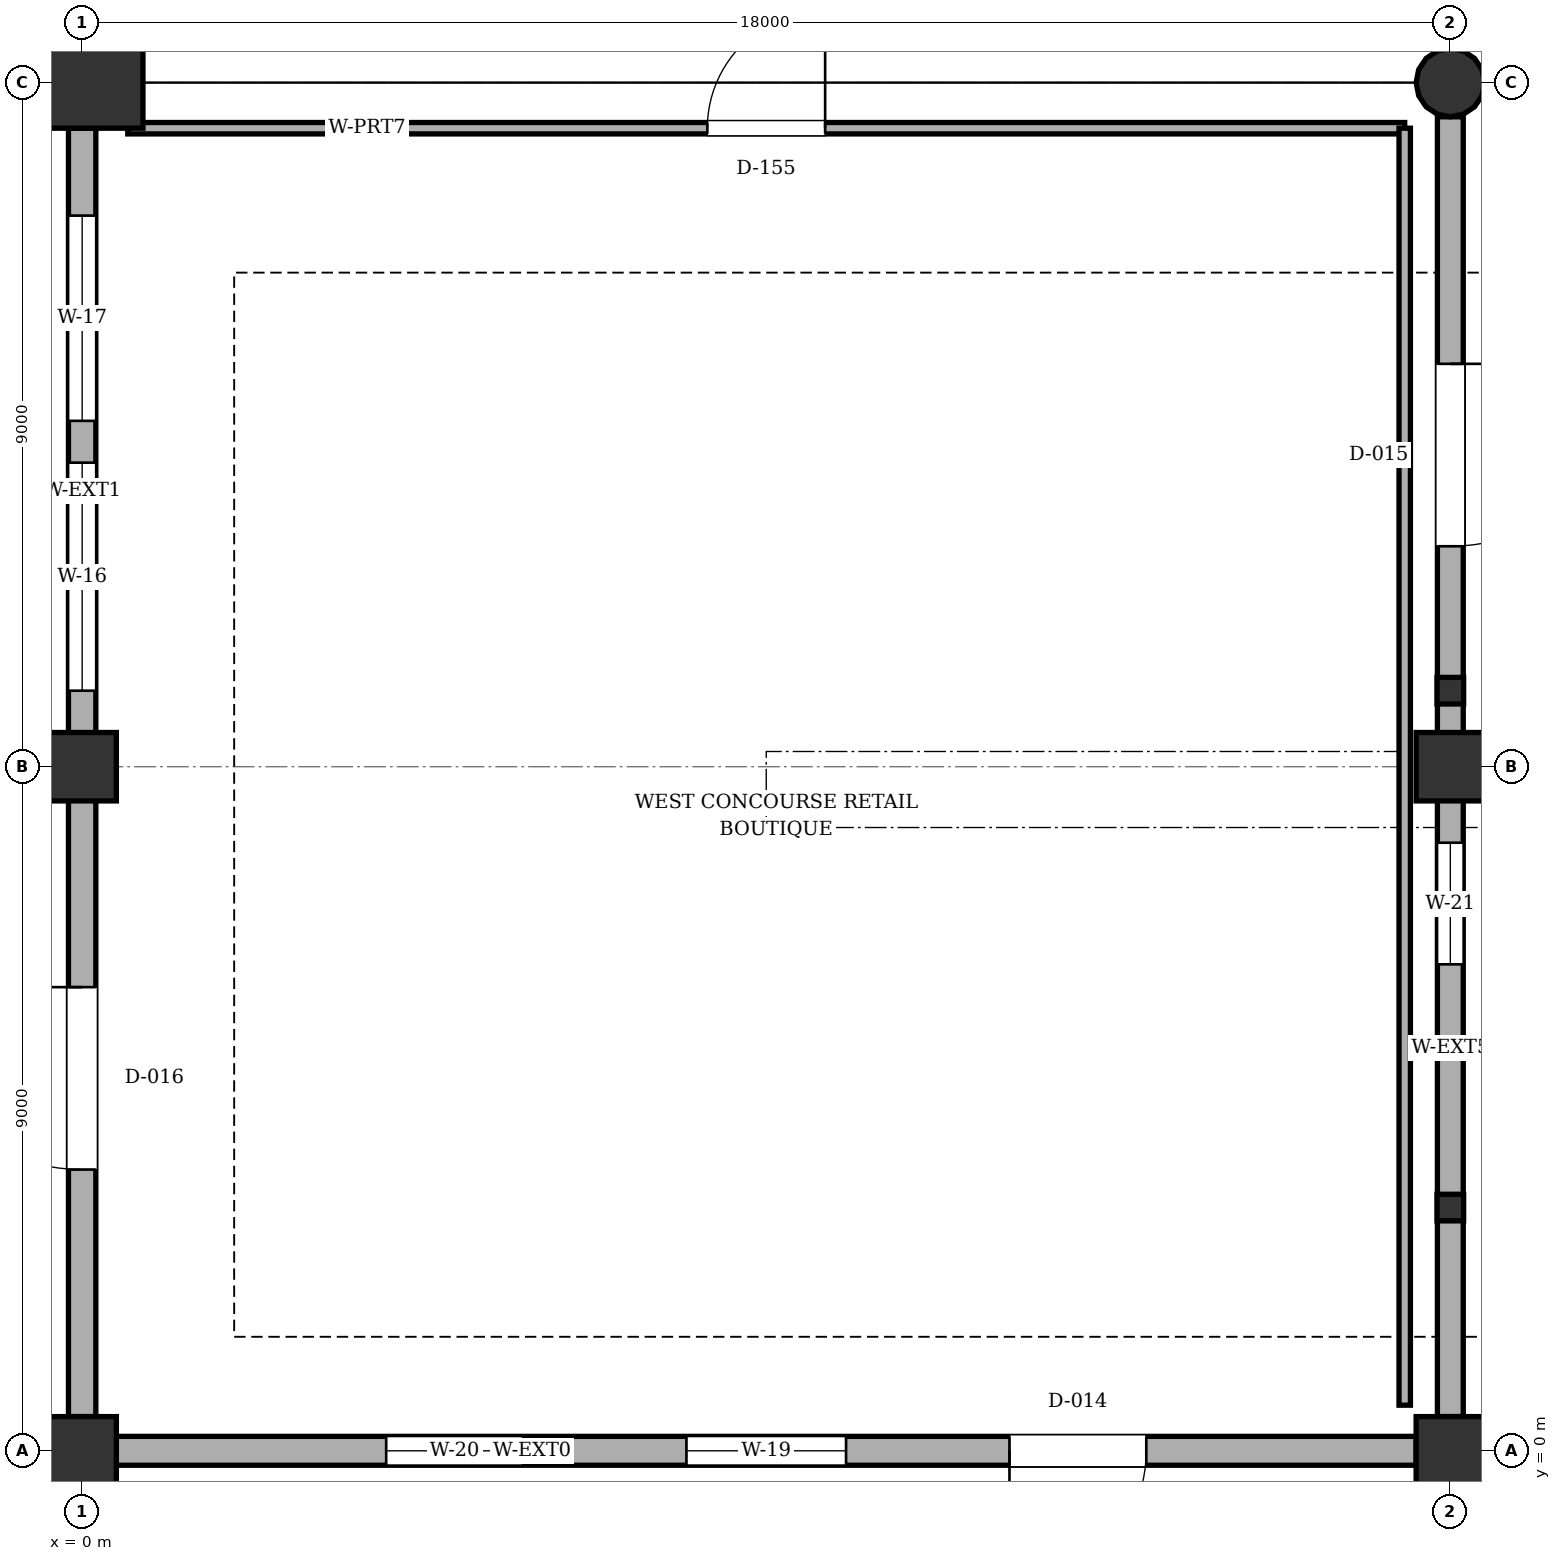
"""IFC4 building model, lengths in metres.
Left out: names, types, materials, properties, quantities, classifications, styles, units other than length and angle.
Written with IfcOpenShell. Run it as: python <this file> out.ifc"""

import sys

from ifc_helpers import new_model, si_unit, direction, frame, frame_2d, origin, origin_2d, place, context, subcontext, project, spatial, rectangle, circle, i_section, extrude, element, fill, save


model = new_model("IFC4")
c1 = context("Model", 3, precision=1e-05, world=origin(), true_north=direction((0.0, 1.0)))
c2 = subcontext(c1, "Body", "Model", "MODEL_VIEW")
j1 = project(units=[si_unit("LENGTHUNIT", "METRE"), si_unit("PLANEANGLEUNIT", "RADIAN")], contexts=[c1])
p1 = place(None, origin())
s1 = spatial("IfcSite", under=j1, at=p1, CompositionType="ELEMENT")
p2 = place(p1, origin())
s2 = spatial("IfcBuilding", under=s1, at=p2, CompositionType="ELEMENT")
p3 = place(p2, origin())
s3 = spatial("IfcBuildingStorey", under=s2, at=p3, CompositionType="ELEMENT", Elevation=0.0)
for number, where, z_axis, x_axis in (
    (1, (0.0, 0.0, 0.0), (0.0, 0.0, 1.0), (1.0, 0.0, 0.0)),
    (2, (0.0, 9.0, 0.0), (0.0, 0.0, 1.0), (1.0, 0.0, 0.0)),
):
    element("IfcColumn", number, at=place(p3, frame(where, z_axis=z_axis, x_axis=x_axis)), inside=s3, PredefinedType="COLUMN", context=c2, shape_type="SweptSolid", body=[
        extrude(rectangle(XDim=0.9, YDim=0.9, at=origin_2d()), origin(), (0.0, 0.0, 1.0), 6.6),
    ])
p4 = place(p3, frame((0.0, 18.0, 0.0), z_axis=(0.0, 0.0, 1.0), x_axis=(1.0, 0.0, 0.0)))
e3 = element("IfcColumn", 3, at=p4, inside=s3, PredefinedType="COLUMN", context=c2, shape_type="SweptSolid", body=[
    extrude(rectangle(XDim=1.6, YDim=1.2, at=origin_2d()), origin(), (0.0, 0.0, 1.0), 6.6),
])
for number, where, z_axis, x_axis in (
    (4, (18.0, 0.0, 0.0), (0.0, 0.0, 1.0), (1.0, 0.0, 0.0)),
    (5, (18.0, 9.0, 0.0), (0.0, 0.0, 1.0), (1.0, 0.0, 0.0)),
):
    element("IfcColumn", number, at=place(p3, frame(where, z_axis=z_axis, x_axis=x_axis)), inside=s3, PredefinedType="COLUMN", context=c2, shape_type="SweptSolid", body=[
        extrude(rectangle(XDim=0.9, YDim=0.9, at=origin_2d()), origin(), (0.0, 0.0, 1.0), 6.6),
    ])
p5 = place(p3, frame((18.0, 18.0, 0.0), z_axis=(0.0, 0.0, 1.0), x_axis=(1.0, 0.0, 0.0)))
e6 = element("IfcColumn", 6, at=p5, inside=s3, PredefinedType="COLUMN", context=c2, shape_type="SweptSolid", body=[
    extrude(circle(Radius=0.45, at=origin_2d()), origin(), (0.0, 0.0, 1.0), 6.6),
])
for number, where, z_axis, x_axis in (
    (7, (18.0, 3.2, 0.0), (0.0, 0.0, 1.0), (1.0, 0.0, 0.0)),
    (8, (18.0, 10.0, 0.0), (0.0, 0.0, 1.0), (1.0, 0.0, 0.0)),
):
    element("IfcColumn", number, at=place(p3, frame(where, z_axis=z_axis, x_axis=x_axis)), inside=s3, PredefinedType="COLUMN", context=c2, shape_type="SweptSolid", body=[
        extrude(i_section(OverallWidth=0.35, OverallDepth=0.35, WebThickness=0.012, FlangeThickness=0.019, FilletRadius=0.02, at=origin_2d()), origin(), (0.0, 0.0, 1.0), 7.62),
    ])
p6 = place(p3, frame((17.55, 0.0, 0.0), z_axis=(0.0, 0.0, 1.0), x_axis=(-1.0, 0.0, 0.0)))
e9 = element("IfcWall", 9, at=p6, inside=s3, PredefinedType="SOLIDWALL", context=c2, shape_type="SweptSolid", body=[
    extrude(rectangle(XDim=17.1, YDim=0.38, at=frame_2d((8.55, 0.0))), origin(), (0.0, 0.0, 1.0), 5.79),
])
p7 = place(p6, frame((3.55, 0.0, 0.0)))
e10 = element("IfcOpeningElement", 10, at=p7, cuts=e9, PredefinedType="OPENING", context=c2, shape_type="SweptSolid", body=[
    extrude(rectangle(XDim=1.8, YDim=2.35, at=frame_2d((0.9, 1.175))), frame((0.0, 0.2, 0.0), z_axis=(0.0, -1.0, 0.0), x_axis=(1.0, 0.0, 0.0)), (0.0, 0.0, 1.0), 0.4),
])
p8 = place(p6, frame((7.5, 0.0, 0.95)))
e11 = element("IfcOpeningElement", 11, at=p8, cuts=e9, PredefinedType="OPENING", context=c2, shape_type="SweptSolid", body=[
    extrude(rectangle(XDim=2.1, YDim=2.0, at=frame_2d((1.05, 1.0))), frame((0.0, 0.2, 0.0), z_axis=(0.0, -1.0, 0.0), x_axis=(1.0, 0.0, 0.0)), (0.0, 0.0, 1.0), 0.4),
])
p9 = place(p6, frame((11.75, 0.0, 0.95)))
e12 = element("IfcOpeningElement", 12, at=p9, cuts=e9, PredefinedType="OPENING", context=c2, shape_type="SweptSolid", body=[
    extrude(rectangle(XDim=1.8, YDim=2.0, at=frame_2d((0.9, 1.0))), frame((0.0, 0.2, 0.0), z_axis=(0.0, -1.0, 0.0), x_axis=(1.0, 0.0, 0.0)), (0.0, 0.0, 1.0), 0.4),
])
p10 = place(p3, frame((18.0, 17.55, 0.0), z_axis=(0.0, 0.0, 1.0), x_axis=(0.0, -1.0, 0.0)))
e13 = element("IfcWall", 13, at=p10, inside=s3, PredefinedType="SOLIDWALL", context=c2, shape_type="SweptSolid", body=[
    extrude(rectangle(XDim=17.1, YDim=0.34, at=frame_2d((8.55, 0.0))), origin(), (0.0, 0.0, 1.0), 5.595),
])
p11 = place(p10, frame((3.25, 0.0, 0.0)))
e14 = element("IfcOpeningElement", 14, at=p11, cuts=e13, PredefinedType="OPENING", context=c2, shape_type="SweptSolid", body=[
    extrude(rectangle(XDim=2.4, YDim=2.5, at=frame_2d((1.2, 1.25))), frame((0.0, 0.18, 0.0), z_axis=(0.0, -1.0, 0.0), x_axis=(1.0, 0.0, 0.0)), (0.0, 0.0, 1.0), 0.36),
])
p12 = place(p10, frame((9.55, 0.0, 0.95)))
e15 = element("IfcOpeningElement", 15, at=p12, cuts=e13, PredefinedType="OPENING", context=c2, shape_type="SweptSolid", body=[
    extrude(rectangle(XDim=1.6, YDim=1.9, at=frame_2d((0.8, 0.95))), frame((0.0, 0.18, 0.0), z_axis=(0.0, -1.0, 0.0), x_axis=(1.0, 0.0, 0.0)), (0.0, 0.0, 1.0), 0.36),
])
p13 = place(p3, frame((0.0, 0.45, 0.0), z_axis=(0.0, 0.0, 1.0), x_axis=(0.0, 1.0, 0.0)))
e16 = element("IfcWall", 16, at=p13, inside=s3, PredefinedType="SOLIDWALL", context=c2, shape_type="SweptSolid", body=[
    extrude(rectangle(XDim=16.95, YDim=0.36, at=frame_2d((8.475, 0.0))), origin(), (0.0, 0.0, 1.0), 5.67),
])
p14 = place(p13, frame((3.25, 0.0, 0.0)))
e17 = element("IfcOpeningElement", 17, at=p14, cuts=e16, PredefinedType="OPENING", context=c2, shape_type="SweptSolid", body=[
    extrude(rectangle(XDim=2.4, YDim=2.5, at=frame_2d((1.2, 1.25))), frame((0.0, 0.19, 0.0), z_axis=(0.0, -1.0, 0.0), x_axis=(1.0, 0.0, 0.0)), (0.0, 0.0, 1.0), 0.38),
])
p15 = place(p13, frame((9.55, 0.0, 0.95)))
e18 = element("IfcOpeningElement", 18, at=p15, cuts=e16, PredefinedType="OPENING", context=c2, shape_type="SweptSolid", body=[
    extrude(rectangle(XDim=3.0, YDim=2.1, at=frame_2d((1.5, 1.05))), frame((0.0, 0.19, 0.0), z_axis=(0.0, -1.0, 0.0), x_axis=(1.0, 0.0, 0.0)), (0.0, 0.0, 1.0), 0.38),
])
p16 = place(p13, frame((13.1, 0.0, 0.95)))
e19 = element("IfcOpeningElement", 19, at=p16, cuts=e16, PredefinedType="OPENING", context=c2, shape_type="SweptSolid", body=[
    extrude(rectangle(XDim=2.7, YDim=2.1, at=frame_2d((1.35, 1.05))), frame((0.0, 0.19, 0.0), z_axis=(0.0, -1.0, 0.0), x_axis=(1.0, 0.0, 0.0)), (0.0, 0.0, 1.0), 0.38),
])
p17 = place(p3, frame((0.6, 17.4, 0.0), z_axis=(0.0, 0.0, 1.0), x_axis=(1.0, 0.0, 0.0)))
e20 = element("IfcWall", 20, at=p17, inside=s3, PredefinedType="PARTITIONING", context=c2, shape_type="SweptSolid", body=[
    extrude(rectangle(XDim=16.8, YDim=0.15, at=frame_2d((8.4, 0.0))), origin(), (0.0, 0.0, 1.0), 4.4),
])
p18 = place(p17, frame((7.625, 0.0, 0.0)))
e21 = element("IfcOpeningElement", 21, at=p18, cuts=e20, PredefinedType="OPENING", context=c2, shape_type="SweptSolid", body=[
    extrude(rectangle(XDim=1.55, YDim=2.1, at=frame_2d((0.775, 1.05))), frame((0.0, 0.085, 0.0), z_axis=(0.0, -1.0, 0.0), x_axis=(1.0, 0.0, 0.0)), (0.0, 0.0, 1.0), 0.17),
])
p19 = place(p3, frame((17.4, 17.4, 0.0), z_axis=(0.0, 0.0, 1.0), x_axis=(0.0, -1.0, 0.0)))
e22 = element("IfcWall", 22, at=p19, inside=s3, PredefinedType="PARTITIONING", context=c2, shape_type="SweptSolid", body=[
    extrude(rectangle(XDim=16.8, YDim=0.15, at=frame_2d((8.4, 0.0))), origin(), (0.0, 0.0, 1.0), 4.4),
])
p20 = place(p7, origin())
e23 = element("IfcDoor", 23, at=p20, inside=s3, OperationType="SINGLE_SWING_RIGHT", PredefinedType="DOOR", context=c2, shape_type="SweptSolid", body=[
    extrude(rectangle(XDim=1.8, YDim=2.35, at=frame_2d((0.9, 1.175))), frame((0.0, 0.025, 0.0), z_axis=(0.0, -1.0, 0.0), x_axis=(1.0, 0.0, 0.0)), (0.0, 0.0, 1.0), 0.05),
])
fill(e10, e23)
p21 = place(p8, origin())
e24 = element("IfcWindow", 24, at=p21, inside=s3, PartitioningType="SINGLE_PANEL", PredefinedType="WINDOW", context=c2, shape_type="SweptSolid", body=[
    extrude(rectangle(XDim=2.1, YDim=2.0, at=frame_2d((1.05, 1.0))), frame((0.0, 0.03, 0.0), z_axis=(0.0, -1.0, 0.0), x_axis=(1.0, 0.0, 0.0)), (0.0, 0.0, 1.0), 0.06),
])
fill(e11, e24)
p22 = place(p9, origin())
e25 = element("IfcWindow", 25, at=p22, inside=s3, PartitioningType="SINGLE_PANEL", PredefinedType="WINDOW", context=c2, shape_type="SweptSolid", body=[
    extrude(rectangle(XDim=1.8, YDim=2.0, at=frame_2d((0.9, 1.0))), frame((0.0, 0.03, 0.0), z_axis=(0.0, -1.0, 0.0), x_axis=(1.0, 0.0, 0.0)), (0.0, 0.0, 1.0), 0.06),
])
fill(e12, e25)
p23 = place(p11, origin())
e26 = element("IfcDoor", 26, at=p23, inside=s3, OperationType="SINGLE_SWING_LEFT", PredefinedType="DOOR", context=c2, shape_type="SweptSolid", body=[
    extrude(rectangle(XDim=2.4, YDim=2.5, at=frame_2d((1.2, 1.25))), frame((0.0, 0.025, 0.0), z_axis=(0.0, -1.0, 0.0), x_axis=(1.0, 0.0, 0.0)), (0.0, 0.0, 1.0), 0.05),
])
fill(e14, e26)
p24 = place(p12, origin())
e27 = element("IfcWindow", 27, at=p24, inside=s3, PartitioningType="SINGLE_PANEL", PredefinedType="WINDOW", context=c2, shape_type="SweptSolid", body=[
    extrude(rectangle(XDim=1.6, YDim=1.9, at=frame_2d((0.8, 0.95))), frame((0.0, 0.03, 0.0), z_axis=(0.0, -1.0, 0.0), x_axis=(1.0, 0.0, 0.0)), (0.0, 0.0, 1.0), 0.06),
])
fill(e15, e27)
p25 = place(p14, origin())
e28 = element("IfcDoor", 28, at=p25, inside=s3, OperationType="SINGLE_SWING_RIGHT", PredefinedType="DOOR", context=c2, shape_type="SweptSolid", body=[
    extrude(rectangle(XDim=2.4, YDim=2.5, at=frame_2d((1.2, 1.25))), frame((0.0, 0.025, 0.0), z_axis=(0.0, -1.0, 0.0), x_axis=(1.0, 0.0, 0.0)), (0.0, 0.0, 1.0), 0.05),
])
fill(e17, e28)
p26 = place(p15, origin())
e29 = element("IfcWindow", 29, at=p26, inside=s3, PartitioningType="SINGLE_PANEL", PredefinedType="WINDOW", context=c2, shape_type="SweptSolid", body=[
    extrude(rectangle(XDim=3.0, YDim=2.1, at=frame_2d((1.5, 1.05))), frame((0.0, 0.03, 0.0), z_axis=(0.0, -1.0, 0.0), x_axis=(1.0, 0.0, 0.0)), (0.0, 0.0, 1.0), 0.06),
])
fill(e18, e29)
p27 = place(p16, origin())
e30 = element("IfcWindow", 30, at=p27, inside=s3, PartitioningType="SINGLE_PANEL", PredefinedType="WINDOW", context=c2, shape_type="SweptSolid", body=[
    extrude(rectangle(XDim=2.7, YDim=2.1, at=frame_2d((1.35, 1.05))), frame((0.0, 0.03, 0.0), z_axis=(0.0, -1.0, 0.0), x_axis=(1.0, 0.0, 0.0)), (0.0, 0.0, 1.0), 0.06),
])
fill(e19, e30)
p28 = place(p18, origin())
e31 = element("IfcDoor", 31, at=p28, inside=s3, OperationType="SINGLE_SWING_RIGHT", PredefinedType="DOOR", context=c2, shape_type="SweptSolid", body=[
    extrude(rectangle(XDim=1.55, YDim=2.1, at=frame_2d((0.775, 1.05))), frame((0.0, 0.025, 0.0), z_axis=(0.0, -1.0, 0.0), x_axis=(1.0, 0.0, 0.0)), (0.0, 0.0, 1.0), 0.05),
])
fill(e21, e31)
save(model, sys.argv[1])
